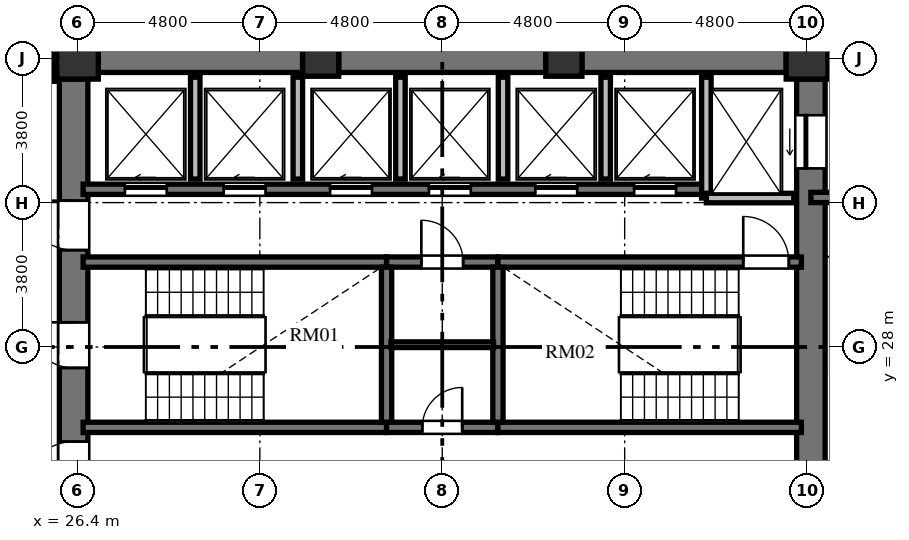
"""IFC4 building model, lengths in metres.
Left out: names, types, materials, properties, quantities, classifications, styles, units other than length and angle.
Written with IfcOpenShell. Run it as: python <this file> out.ifc"""

import sys

from ifc_helpers import new_model, si_unit, direction, frame, frame_2d, origin, origin_2d, place, context, subcontext, project, spatial, rectangle, extrude, element, fill, save


model = new_model("IFC4")
c1 = context("Model", 3, precision=1e-05, world=origin(), true_north=direction((0.0, 1.0)))
c2 = subcontext(c1, "Body", "Model", "MODEL_VIEW")
j1 = project(units=[si_unit("LENGTHUNIT", "METRE"), si_unit("PLANEANGLEUNIT", "RADIAN")], contexts=[c1])
p1 = place(None, origin())
s1 = spatial("IfcSite", under=j1, at=p1, CompositionType="ELEMENT")
p2 = place(p1, origin())
s2 = spatial("IfcBuilding", under=s1, at=p2, CompositionType="ELEMENT")
p3 = place(p2, frame((0.0, 0.0, 81.744)))
s3 = spatial("IfcBuildingStorey", under=s2, at=p3, CompositionType="ELEMENT", Elevation=81.744)
p4 = place(p3, frame((45.6, 35.6, 0.0), z_axis=(0.0, 0.0, 1.0), x_axis=(1.0, 0.0, 0.0)))
e1 = element("IfcColumn", 1, at=p4, inside=s3, PredefinedType="COLUMN", context=c2, shape_type="SweptSolid", body=[
    extrude(rectangle(XDim=1.1, YDim=1.1, at=origin_2d()), origin(), (0.0, 0.0, 1.0), 3.648),
])
for number, where, z_axis, x_axis in (
    (2, (39.2, 35.6, 0.0), (0.0, 0.0, 1.0), (1.0, 0.0, 0.0)),
    (3, (32.8, 35.6, 0.0), (0.0, 0.0, 1.0), (1.0, 0.0, 0.0)),
):
    element("IfcColumn", number, at=place(p3, frame(where, z_axis=z_axis, x_axis=x_axis)), inside=s3, PredefinedType="COLUMN", context=c2, shape_type="SweptSolid", body=[
        extrude(rectangle(XDim=0.95, YDim=0.95, at=origin_2d()), origin(), (0.0, 0.0, 1.0), 3.648),
    ])
p5 = place(p3, frame((26.4, 35.6, 0.0), z_axis=(0.0, 0.0, 1.0), x_axis=(1.0, 0.0, 0.0)))
e4 = element("IfcColumn", 4, at=p5, inside=s3, PredefinedType="COLUMN", context=c2, shape_type="SweptSolid", body=[
    extrude(rectangle(XDim=1.1, YDim=1.1, at=origin_2d()), origin(), (0.0, 0.0, 1.0), 3.648),
])
p6 = place(p3, frame((26.3, 20.95, 0.0), z_axis=(0.0, 0.0, 1.0), x_axis=(0.0, 1.0, 0.0)))
e5 = element("IfcWall", 5, at=p6, inside=s3, PredefinedType="SHEAR", context=c2, shape_type="SweptSolid", body=[
    extrude(rectangle(XDim=14.1, YDim=0.75, at=frame_2d((7.05, 0.0))), origin(), (0.0, 0.0, 1.0), 3.648),
])
p7 = place(p6, frame((6.5, 0.0, 0.0)))
e6 = element("IfcOpeningElement", 6, at=p7, cuts=e5, PredefinedType="OPENING", context=c2, shape_type="SweptSolid", body=[
    extrude(rectangle(XDim=1.2, YDim=2.15, at=frame_2d((0.6, 1.075))), frame((0.0, 0.385, 0.0), z_axis=(0.0, -1.0, 0.0), x_axis=(1.0, 0.0, 0.0)), (0.0, 0.0, 1.0), 0.77),
])
p8 = place(p6, frame((9.6, 0.0, 0.0)))
e7 = element("IfcOpeningElement", 7, at=p8, cuts=e5, PredefinedType="OPENING", context=c2, shape_type="SweptSolid", body=[
    extrude(rectangle(XDim=1.3, YDim=2.2, at=frame_2d((0.65, 1.1))), frame((0.0, 0.385, 0.0), z_axis=(0.0, -1.0, 0.0), x_axis=(1.0, 0.0, 0.0)), (0.0, 0.0, 1.0), 0.77),
])
p9 = place(p6, frame((3.26, 0.0, 0.0)))
e8 = element("IfcOpeningElement", 8, at=p9, cuts=e5, PredefinedType="OPENING", context=c2, shape_type="SweptSolid", body=[
    extrude(rectangle(XDim=1.3, YDim=2.2, at=frame_2d((0.65, 1.1))), frame((0.0, 0.385, 0.0), z_axis=(0.0, -1.0, 0.0), x_axis=(1.0, 0.0, 0.0)), (0.0, 0.0, 1.0), 0.77),
])
p10 = place(p3, frame((45.7, 20.95, 0.0), z_axis=(0.0, 0.0, 1.0), x_axis=(0.0, 1.0, 0.0)))
e9 = element("IfcWall", 9, at=p10, inside=s3, PredefinedType="SHEAR", context=c2, shape_type="SweptSolid", body=[
    extrude(rectangle(XDim=14.1, YDim=0.75, at=frame_2d((7.05, 0.0))), origin(), (0.0, 0.0, 1.0), 3.648),
])
p11 = place(p10, frame((11.75, 0.0, 0.0)))
e10 = element("IfcOpeningElement", 10, at=p11, cuts=e9, PredefinedType="OPENING", context=c2, shape_type="SweptSolid", body=[
    extrude(rectangle(XDim=1.4, YDim=2.3, at=frame_2d((0.7, 1.15))), frame((0.0, 0.385, 0.0), z_axis=(0.0, -1.0, 0.0), x_axis=(1.0, 0.0, 0.0)), (0.0, 0.0, 1.0), 0.77),
])
p12 = place(p10, frame((0.95, 0.0, 0.0)))
e11 = element("IfcOpeningElement", 11, at=p12, cuts=e9, PredefinedType="OPENING", context=c2, shape_type="SweptSolid", body=[
    extrude(rectangle(XDim=1.4, YDim=2.3, at=frame_2d((0.7, 1.15))), frame((0.0, 0.385, 0.0), z_axis=(0.0, -1.0, 0.0), x_axis=(1.0, 0.0, 0.0)), (0.0, 0.0, 1.0), 0.77),
])
p13 = place(p3, frame((26.95, 35.6, 0.0), z_axis=(0.0, 0.0, 1.0), x_axis=(1.0, 0.0, 0.0)))
e12 = element("IfcWall", 12, at=p13, inside=s3, PredefinedType="SHEAR", context=c2, shape_type="SweptSolid", body=[
    extrude(rectangle(XDim=5.375, YDim=0.75, at=frame_2d((2.688, 0.0))), origin(), (0.0, 0.0, 1.0), 3.648),
])
p14 = place(p3, frame((33.275, 35.6, 0.0), z_axis=(0.0, 0.0, 1.0), x_axis=(1.0, 0.0, 0.0)))
e13 = element("IfcWall", 13, at=p14, inside=s3, PredefinedType="SHEAR", context=c2, shape_type="SweptSolid", body=[
    extrude(rectangle(XDim=5.45, YDim=0.75, at=frame_2d((2.725, 0.0))), origin(), (0.0, 0.0, 1.0), 3.648),
])
p15 = place(p3, frame((39.675, 35.6, 0.0), z_axis=(0.0, 0.0, 1.0), x_axis=(1.0, 0.0, 0.0)))
e14 = element("IfcWall", 14, at=p15, inside=s3, PredefinedType="SHEAR", context=c2, shape_type="SweptSolid", body=[
    extrude(rectangle(XDim=5.375, YDim=0.75, at=frame_2d((2.688, 0.0))), origin(), (0.0, 0.0, 1.0), 3.648),
])
p16 = place(p3, frame((26.55, 30.235, 0.0), z_axis=(0.0, 0.0, 1.0), x_axis=(1.0, 0.0, 0.0)))
e15 = element("IfcWall", 15, at=p16, inside=s3, PredefinedType="SHEAR", context=c2, shape_type="SweptSolid", body=[
    extrude(rectangle(XDim=7.985, YDim=0.27, at=frame_2d((3.992, 0.0))), origin(), (0.0, 0.0, 1.0), 3.648),
])
p17 = place(p3, frame((34.535, 30.235, 0.0), z_axis=(0.0, 0.0, 1.0), x_axis=(1.0, 0.0, 0.0)))
e16 = element("IfcWall", 16, at=p17, inside=s3, PredefinedType="SHEAR", context=c2, shape_type="SweptSolid", body=[
    extrude(rectangle(XDim=2.93, YDim=0.27, at=frame_2d((1.465, 0.0))), origin(), (0.0, 0.0, 1.0), 3.648),
])
p18 = place(p17, frame((0.915, 0.0, 0.0)))
e17 = element("IfcOpeningElement", 17, at=p18, cuts=e16, PredefinedType="OPENING", context=c2, shape_type="SweptSolid", body=[
    extrude(rectangle(XDim=1.1, YDim=2.15, at=frame_2d((0.55, 1.075))), frame((0.0, 0.145, 0.0), z_axis=(0.0, -1.0, 0.0), x_axis=(1.0, 0.0, 0.0)), (0.0, 0.0, 1.0), 0.29),
])
p19 = place(p3, frame((37.465, 30.235, 0.0), z_axis=(0.0, 0.0, 1.0), x_axis=(1.0, 0.0, 0.0)))
e18 = element("IfcWall", 18, at=p19, inside=s3, PredefinedType="SHEAR", context=c2, shape_type="SweptSolid", body=[
    extrude(rectangle(XDim=7.985, YDim=0.27, at=frame_2d((3.992, 0.0))), origin(), (0.0, 0.0, 1.0), 3.648),
])
p20 = place(p19, frame((6.455, 0.0, 0.0)))
e19 = element("IfcOpeningElement", 19, at=p20, cuts=e18, PredefinedType="OPENING", context=c2, shape_type="SweptSolid", body=[
    extrude(rectangle(XDim=1.2, YDim=2.15, at=frame_2d((0.6, 1.075))), frame((0.0, 0.145, 0.0), z_axis=(0.0, -1.0, 0.0), x_axis=(1.0, 0.0, 0.0)), (0.0, 0.0, 1.0), 0.29),
])
p21 = place(p3, frame((26.55, 25.885, 0.0), z_axis=(0.0, 0.0, 1.0), x_axis=(1.0, 0.0, 0.0)))
e20 = element("IfcWall", 20, at=p21, inside=s3, PredefinedType="SHEAR", context=c2, shape_type="SweptSolid", body=[
    extrude(rectangle(XDim=7.985, YDim=0.27, at=frame_2d((3.992, 0.0))), origin(), (0.0, 0.0, 1.0), 3.648),
])
p22 = place(p3, frame((34.535, 25.885, 0.0), z_axis=(0.0, 0.0, 1.0), x_axis=(1.0, 0.0, 0.0)))
e21 = element("IfcWall", 21, at=p22, inside=s3, PredefinedType="SHEAR", context=c2, shape_type="SweptSolid", body=[
    extrude(rectangle(XDim=2.93, YDim=0.27, at=frame_2d((1.465, 0.0))), origin(), (0.0, 0.0, 1.0), 3.648),
])
p23 = place(p22, frame((0.94, 0.0, 0.0)))
e22 = element("IfcOpeningElement", 22, at=p23, cuts=e21, PredefinedType="OPENING", context=c2, shape_type="SweptSolid", body=[
    extrude(rectangle(XDim=1.05, YDim=2.15, at=frame_2d((0.525, 1.075))), frame((0.0, 0.145, 0.0), z_axis=(0.0, -1.0, 0.0), x_axis=(1.0, 0.0, 0.0)), (0.0, 0.0, 1.0), 0.29),
])
p24 = place(p3, frame((37.465, 25.885, 0.0), z_axis=(0.0, 0.0, 1.0), x_axis=(1.0, 0.0, 0.0)))
e23 = element("IfcWall", 23, at=p24, inside=s3, PredefinedType="SHEAR", context=c2, shape_type="SweptSolid", body=[
    extrude(rectangle(XDim=7.985, YDim=0.27, at=frame_2d((3.992, 0.0))), origin(), (0.0, 0.0, 1.0), 3.648),
])
for number, where, z_axis, x_axis in (
    (24, (34.535, 26.02, 0.0), (0.0, 0.0, 1.0), (0.0, 1.0, 0.0)),
    (25, (37.465, 26.02, 0.0), (0.0, 0.0, 1.0), (0.0, 1.0, 0.0)),
):
    element("IfcWall", number, at=place(p3, frame(where, z_axis=z_axis, x_axis=x_axis)), inside=s3, PredefinedType="SHEAR", context=c2, shape_type="SweptSolid", body=[
        extrude(rectangle(XDim=4.08, YDim=0.27, at=frame_2d((2.04, 0.0))), origin(), (0.0, 0.0, 1.0), 3.648),
    ])
p25 = place(p3, frame((34.65, 28.06, 0.0), z_axis=(0.0, 0.0, 1.0), x_axis=(1.0, 0.0, 0.0)))
e26 = element("IfcWall", 26, at=p25, inside=s3, PredefinedType="PARTITIONING", context=c2, shape_type="SweptSolid", body=[
    extrude(rectangle(XDim=2.7, YDim=0.15, at=frame_2d((1.35, 0.0))), origin(), (0.0, 0.0, 1.0), 3.428),
])
p26 = place(p3, frame((26.55, 32.15, 0.0), z_axis=(0.0, 0.0, 1.0), x_axis=(1.0, 0.0, 0.0)))
e27 = element("IfcWall", 27, at=p26, inside=s3, PredefinedType="SHEAR", context=c2, shape_type="SweptSolid", body=[
    extrude(rectangle(XDim=16.4, YDim=0.27, at=frame_2d((8.2, 0.0))), origin(), (0.0, 0.0, 1.0), 3.648),
])
p27 = place(p26, frame((1.1, 0.0, 0.0)))
e28 = element("IfcOpeningElement", 28, at=p27, cuts=e27, PredefinedType="OPENING", context=c2, shape_type="SweptSolid", body=[
    extrude(rectangle(XDim=1.1, YDim=2.2, at=frame_2d((0.55, 1.1))), frame((0.0, 0.145, 0.0), z_axis=(0.0, -1.0, 0.0), x_axis=(1.0, 0.0, 0.0)), (0.0, 0.0, 1.0), 0.29),
])
p28 = place(p26, frame((3.7, 0.0, 0.0)))
e29 = element("IfcOpeningElement", 29, at=p28, cuts=e27, PredefinedType="OPENING", context=c2, shape_type="SweptSolid", body=[
    extrude(rectangle(XDim=1.1, YDim=2.2, at=frame_2d((0.55, 1.1))), frame((0.0, 0.145, 0.0), z_axis=(0.0, -1.0, 0.0), x_axis=(1.0, 0.0, 0.0)), (0.0, 0.0, 1.0), 0.29),
])
p29 = place(p26, frame((6.5, 0.0, 0.0)))
e30 = element("IfcOpeningElement", 30, at=p29, cuts=e27, PredefinedType="OPENING", context=c2, shape_type="SweptSolid", body=[
    extrude(rectangle(XDim=1.1, YDim=2.2, at=frame_2d((0.55, 1.1))), frame((0.0, 0.145, 0.0), z_axis=(0.0, -1.0, 0.0), x_axis=(1.0, 0.0, 0.0)), (0.0, 0.0, 1.0), 0.29),
])
p30 = place(p26, frame((9.1, 0.0, 0.0)))
e31 = element("IfcOpeningElement", 31, at=p30, cuts=e27, PredefinedType="OPENING", context=c2, shape_type="SweptSolid", body=[
    extrude(rectangle(XDim=1.1, YDim=2.2, at=frame_2d((0.55, 1.1))), frame((0.0, 0.145, 0.0), z_axis=(0.0, -1.0, 0.0), x_axis=(1.0, 0.0, 0.0)), (0.0, 0.0, 1.0), 0.29),
])
p31 = place(p26, frame((11.9, 0.0, 0.0)))
e32 = element("IfcOpeningElement", 32, at=p31, cuts=e27, PredefinedType="OPENING", context=c2, shape_type="SweptSolid", body=[
    extrude(rectangle(XDim=1.1, YDim=2.2, at=frame_2d((0.55, 1.1))), frame((0.0, 0.145, 0.0), z_axis=(0.0, -1.0, 0.0), x_axis=(1.0, 0.0, 0.0)), (0.0, 0.0, 1.0), 0.29),
])
p32 = place(p26, frame((14.5, 0.0, 0.0)))
e33 = element("IfcOpeningElement", 33, at=p32, cuts=e27, PredefinedType="OPENING", context=c2, shape_type="SweptSolid", body=[
    extrude(rectangle(XDim=1.1, YDim=2.2, at=frame_2d((0.55, 1.1))), frame((0.0, 0.145, 0.0), z_axis=(0.0, -1.0, 0.0), x_axis=(1.0, 0.0, 0.0)), (0.0, 0.0, 1.0), 0.29),
])
p33 = place(p3, frame((42.95, 31.92, 0.0), z_axis=(0.0, 0.0, 1.0), x_axis=(0.0, 1.0, 0.0)))
e34 = element("IfcWall", 34, at=p33, inside=s3, PredefinedType="SOLIDWALL", context=c2, shape_type="SweptSolid", body=[
    extrude(rectangle(XDim=3.18, YDim=0.25, at=frame_2d((1.59, 0.0))), origin(), (0.0, 0.0, 1.0), 3.428),
])
p34 = place(p3, frame((42.95, 31.92, 0.0), z_axis=(0.0, 0.0, 1.0), x_axis=(1.0, 0.0, 0.0)))
e35 = element("IfcWall", 35, at=p34, inside=s3, PredefinedType="SOLIDWALL", context=c2, shape_type="SweptSolid", body=[
    extrude(rectangle(XDim=2.3, YDim=0.25, at=frame_2d((1.15, 0.0))), origin(), (0.0, 0.0, 1.0), 3.428),
])
for number, where, z_axis, x_axis in (
    (36, (29.5, 32.42, 0.0), (0.0, 0.0, 1.0), (0.0, 1.0, 0.0)),
    (37, (32.2, 32.42, 0.0), (0.0, 0.0, 1.0), (0.0, 1.0, 0.0)),
    (38, (34.9, 32.42, 0.0), (0.0, 0.0, 1.0), (0.0, 1.0, 0.0)),
    (39, (37.6, 32.42, 0.0), (0.0, 0.0, 1.0), (0.0, 1.0, 0.0)),
    (40, (40.3, 32.42, 0.0), (0.0, 0.0, 1.0), (0.0, 1.0, 0.0)),
):
    element("IfcWall", number, at=place(p3, frame(where, z_axis=z_axis, x_axis=x_axis)), inside=s3, PredefinedType="SOLIDWALL", context=c2, shape_type="SweptSolid", body=[
        extrude(rectangle(XDim=2.68, YDim=0.25, at=frame_2d((1.34, 0.0))), origin(), (0.0, 0.0, 1.0), 3.428),
    ])
p35 = place(p3, frame((45.7, 31.935, 0.0), z_axis=(0.0, 0.0, 1.0), x_axis=(1.0, 0.0, 0.0)))
e41 = element("IfcWall", 41, at=p35, inside=s3, PredefinedType="SHEAR", context=c2, shape_type="SweptSolid", body=[
    extrude(rectangle(XDim=4.715, YDim=0.27, at=frame_2d((2.357, 0.0))), origin(), (0.0, 0.0, 1.0), 3.648),
])
p36 = place(p3, frame((25.83, 36.21, 0.0), z_axis=(0.0, 0.0, 1.0), x_axis=(0.0, -1.0, 0.0)))
e42 = element("IfcWall", 42, at=p36, inside=s3, PredefinedType="PARTITIONING", context=c2, shape_type="SweptSolid", body=[
    extrude(rectangle(XDim=1.22, YDim=0.18, at=frame_2d((0.61, 0.0))), origin(), (0.0, 0.0, 1.0), 3.428),
])
p37 = place(p7, origin())
e43 = element("IfcDoor", 43, at=p37, inside=s3, OperationType="SINGLE_SWING_RIGHT", PredefinedType="DOOR", context=c2, shape_type="SweptSolid", body=[
    extrude(rectangle(XDim=1.2, YDim=2.15, at=frame_2d((0.6, 1.075))), frame((0.0, 0.025, 0.0), z_axis=(0.0, -1.0, 0.0), x_axis=(1.0, 0.0, 0.0)), (0.0, 0.0, 1.0), 0.05),
])
fill(e6, e43)
p38 = place(p20, origin())
e44 = element("IfcDoor", 44, at=p38, inside=s3, OperationType="SINGLE_SWING_LEFT", PredefinedType="DOOR", context=c2, shape_type="SweptSolid", body=[
    extrude(rectangle(XDim=1.2, YDim=2.15, at=frame_2d((0.6, 1.075))), frame((0.0, 0.025, 0.0), z_axis=(0.0, -1.0, 0.0), x_axis=(1.0, 0.0, 0.0)), (0.0, 0.0, 1.0), 0.05),
])
fill(e19, e44)
p39 = place(p23, origin())
e45 = element("IfcDoor", 45, at=p39, inside=s3, OperationType="SINGLE_SWING_RIGHT", PredefinedType="DOOR", context=c2, shape_type="SweptSolid", body=[
    extrude(rectangle(XDim=1.05, YDim=2.15, at=frame_2d((0.525, 1.075))), frame((0.0, 0.025, 0.0), z_axis=(0.0, -1.0, 0.0), x_axis=(1.0, 0.0, 0.0)), (0.0, 0.0, 1.0), 0.05),
])
fill(e22, e45)
p40 = place(p18, origin())
e46 = element("IfcDoor", 46, at=p40, inside=s3, OperationType="SINGLE_SWING_LEFT", PredefinedType="DOOR", context=c2, shape_type="SweptSolid", body=[
    extrude(rectangle(XDim=1.1, YDim=2.15, at=frame_2d((0.55, 1.075))), frame((0.0, 0.025, 0.0), z_axis=(0.0, -1.0, 0.0), x_axis=(1.0, 0.0, 0.0)), (0.0, 0.0, 1.0), 0.05),
])
fill(e17, e46)
p41 = place(p8, origin())
e47 = element("IfcDoor", 47, at=p41, inside=s3, OperationType="SINGLE_SWING_RIGHT", PredefinedType="DOOR", context=c2, shape_type="SweptSolid", body=[
    extrude(rectangle(XDim=1.3, YDim=2.2, at=frame_2d((0.65, 1.1))), frame((0.0, 0.025, 0.0), z_axis=(0.0, -1.0, 0.0), x_axis=(1.0, 0.0, 0.0)), (0.0, 0.0, 1.0), 0.05),
])
fill(e7, e47)
p42 = place(p9, origin())
e48 = element("IfcDoor", 48, at=p42, inside=s3, OperationType="SINGLE_SWING_LEFT", PredefinedType="DOOR", context=c2, shape_type="SweptSolid", body=[
    extrude(rectangle(XDim=1.3, YDim=2.2, at=frame_2d((0.65, 1.1))), frame((0.0, 0.025, 0.0), z_axis=(0.0, -1.0, 0.0), x_axis=(1.0, 0.0, 0.0)), (0.0, 0.0, 1.0), 0.05),
])
fill(e8, e48)
p43 = place(p27, origin())
e49 = element("IfcDoor", 49, at=p43, inside=s3, OperationType="SLIDING_TO_LEFT", PredefinedType="DOOR", context=c2, shape_type="SweptSolid", body=[
    extrude(rectangle(XDim=1.1, YDim=2.2, at=frame_2d((0.55, 1.1))), frame((0.0, 0.025, 0.0), z_axis=(0.0, -1.0, 0.0), x_axis=(1.0, 0.0, 0.0)), (0.0, 0.0, 1.0), 0.05),
])
fill(e28, e49)
p44 = place(p28, origin())
e50 = element("IfcDoor", 50, at=p44, inside=s3, OperationType="SLIDING_TO_LEFT", PredefinedType="DOOR", context=c2, shape_type="SweptSolid", body=[
    extrude(rectangle(XDim=1.1, YDim=2.2, at=frame_2d((0.55, 1.1))), frame((0.0, 0.025, 0.0), z_axis=(0.0, -1.0, 0.0), x_axis=(1.0, 0.0, 0.0)), (0.0, 0.0, 1.0), 0.05),
])
fill(e29, e50)
p45 = place(p29, origin())
e51 = element("IfcDoor", 51, at=p45, inside=s3, OperationType="SLIDING_TO_LEFT", PredefinedType="DOOR", context=c2, shape_type="SweptSolid", body=[
    extrude(rectangle(XDim=1.1, YDim=2.2, at=frame_2d((0.55, 1.1))), frame((0.0, 0.025, 0.0), z_axis=(0.0, -1.0, 0.0), x_axis=(1.0, 0.0, 0.0)), (0.0, 0.0, 1.0), 0.05),
])
fill(e30, e51)
p46 = place(p30, origin())
e52 = element("IfcDoor", 52, at=p46, inside=s3, OperationType="SLIDING_TO_LEFT", PredefinedType="DOOR", context=c2, shape_type="SweptSolid", body=[
    extrude(rectangle(XDim=1.1, YDim=2.2, at=frame_2d((0.55, 1.1))), frame((0.0, 0.025, 0.0), z_axis=(0.0, -1.0, 0.0), x_axis=(1.0, 0.0, 0.0)), (0.0, 0.0, 1.0), 0.05),
])
fill(e31, e52)
p47 = place(p31, origin())
e53 = element("IfcDoor", 53, at=p47, inside=s3, OperationType="SLIDING_TO_LEFT", PredefinedType="DOOR", context=c2, shape_type="SweptSolid", body=[
    extrude(rectangle(XDim=1.1, YDim=2.2, at=frame_2d((0.55, 1.1))), frame((0.0, 0.025, 0.0), z_axis=(0.0, -1.0, 0.0), x_axis=(1.0, 0.0, 0.0)), (0.0, 0.0, 1.0), 0.05),
])
fill(e32, e53)
p48 = place(p32, origin())
e54 = element("IfcDoor", 54, at=p48, inside=s3, OperationType="SLIDING_TO_LEFT", PredefinedType="DOOR", context=c2, shape_type="SweptSolid", body=[
    extrude(rectangle(XDim=1.1, YDim=2.2, at=frame_2d((0.55, 1.1))), frame((0.0, 0.025, 0.0), z_axis=(0.0, -1.0, 0.0), x_axis=(1.0, 0.0, 0.0)), (0.0, 0.0, 1.0), 0.05),
])
fill(e33, e54)
p49 = place(p11, origin())
e55 = element("IfcDoor", 55, at=p49, inside=s3, OperationType="SLIDING_TO_LEFT", PredefinedType="DOOR", context=c2, shape_type="SweptSolid", body=[
    extrude(rectangle(XDim=1.4, YDim=2.3, at=frame_2d((0.7, 1.15))), frame((0.0, 0.025, 0.0), z_axis=(0.0, -1.0, 0.0), x_axis=(1.0, 0.0, 0.0)), (0.0, 0.0, 1.0), 0.05),
])
fill(e10, e55)
save(model, sys.argv[1])
